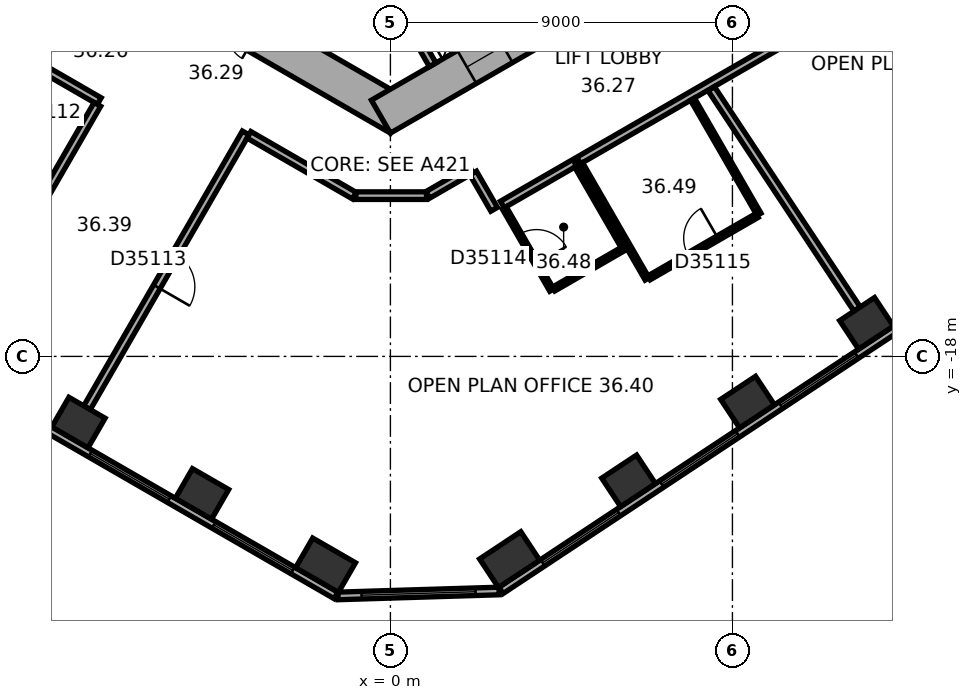
"""IFC4 building model, lengths in metres.
Left out: names, types, materials, properties, quantities, classifications, styles, units other than length and angle.
Written with IfcOpenShell. Run it as: python <this file> out.ifc"""

import sys

from ifc_helpers import new_model, si_unit, direction, frame, frame_2d, origin, origin_2d, place, context, subcontext, project, spatial, rectangle, extrude, element, fill, save


model = new_model("IFC4")
c1 = context("Model", 3, precision=1e-05, world=origin(), true_north=direction((0.0, 1.0)))
c2 = subcontext(c1, "Body", "Model", "MODEL_VIEW")
j1 = project(units=[si_unit("LENGTHUNIT", "METRE"), si_unit("PLANEANGLEUNIT", "RADIAN")], contexts=[c1])
p1 = place(None, origin())
s1 = spatial("IfcSite", under=j1, at=p1, CompositionType="ELEMENT")
p2 = place(p1, origin())
s2 = spatial("IfcBuilding", under=s1, at=p2, CompositionType="ELEMENT")
p3 = place(p2, frame((0.0, 0.0, 150.3)))
s3 = spatial("IfcBuildingStorey", under=s2, at=p3, CompositionType="ELEMENT", Elevation=150.3)
for number, where, z_axis, x_axis in (
    (1, (-8.208, -19.74, 0.0), (0.0, 0.0, 1.0), (0.866, -0.5, 0.0)),
    (2, (-4.958, -21.617, 0.0), (0.0, 0.0, 1.0), (0.866, -0.5, 0.0)),
):
    element("IfcColumn", number, at=place(p3, frame(where, z_axis=z_axis, x_axis=x_axis)), inside=s3, PredefinedType="COLUMN", context=c2, shape_type="SweptSolid", body=[
        extrude(rectangle(XDim=1.1, YDim=0.9, at=origin_2d()), origin(), (0.0, 0.0, 1.0), 3.7),
    ])
for number, where, z_axis, x_axis in (
    (3, (-1.706, -23.494, 0.0), (0.0, 0.0, 1.0), (0.866, -0.5, 0.0)),
    (4, (3.137, -23.346, 0.0), (0.0, 0.0, 1.0), (0.834, 0.552, 0.0)),
):
    element("IfcColumn", number, at=place(p3, frame(where, z_axis=z_axis, x_axis=x_axis)), inside=s3, PredefinedType="COLUMN", context=c2, shape_type="SweptSolid", body=[
        extrude(rectangle(XDim=1.3, YDim=0.9, at=origin_2d()), origin(), (0.0, 0.0, 1.0), 3.7),
    ])
for number, where, z_axis, x_axis in (
    (5, (6.268, -21.274, 0.0), (0.0, 0.0, 1.0), (0.834, 0.552, 0.0)),
    (6, (9.398, -19.202, 0.0), (0.0, 0.0, 1.0), (0.834, 0.552, 0.0)),
    (7, (12.529, -17.13, 0.0), (0.0, 0.0, 1.0), (0.834, 0.552, 0.0)),
):
    element("IfcColumn", number, at=place(p3, frame(where, z_axis=z_axis, x_axis=x_axis)), inside=s3, PredefinedType="COLUMN", context=c2, shape_type="SweptSolid", body=[
        extrude(rectangle(XDim=1.1, YDim=0.9, at=origin_2d()), origin(), (0.0, 0.0, 1.0), 3.7),
    ])
p4 = place(p3, frame((-10.25, -5.629, 0.0), z_axis=(0.0, 0.0, 1.0), x_axis=(0.866022616891, -0.50000482701, 0.0)))
e8 = element("IfcWall", 8, at=p4, inside=s3, PredefinedType="SHEAR", context=c2, shape_type="SweptSolid", body=[
    extrude(rectangle(XDim=12.125, YDim=1.0, at=frame_2d((6.062, 0.0))), origin(), (0.0, 0.0, 1.0), 3.7),
])
p5 = place(p4, frame((6.262, 0.0, 0.0)))
e9 = element("IfcOpeningElement", 9, at=p5, cuts=e8, PredefinedType="OPENING", context=c2, shape_type="SweptSolid", body=[
    extrude(rectangle(XDim=1.5, YDim=2.1, at=frame_2d((0.75, 1.05))), frame((0.0, 0.51, 0.0), z_axis=(0.0, -1.0, 0.0), x_axis=(1.0, 0.0, 0.0)), (0.0, 0.0, 1.0), 1.02),
])
p6 = place(p4, frame((1.712, 0.0, 0.0)))
e10 = element("IfcOpeningElement", 10, at=p6, cuts=e8, PredefinedType="OPENING", context=c2, shape_type="SweptSolid", body=[
    extrude(rectangle(XDim=1.1, YDim=2.1, at=frame_2d((0.55, 1.05))), frame((0.0, 0.51, 0.0), z_axis=(0.0, -1.0, 0.0), x_axis=(1.0, 0.0, 0.0)), (0.0, 0.0, 1.0), 1.02),
])
p7 = place(p4, frame((4.312, 0.0, 0.0)))
e11 = element("IfcOpeningElement", 11, at=p7, cuts=e8, PredefinedType="OPENING", context=c2, shape_type="SweptSolid", body=[
    extrude(rectangle(XDim=1.1, YDim=2.1, at=frame_2d((0.55, 1.05))), frame((0.0, 0.51, 0.0), z_axis=(0.0, -1.0, 0.0), x_axis=(1.0, 0.0, 0.0)), (0.0, 0.0, 1.0), 1.02),
])
p8 = place(p3, frame((-0.25, -11.691, 0.0), z_axis=(0.0, 0.0, 1.0), x_axis=(0.866022616891, 0.50000482701, 0.0)))
e12 = element("IfcWall", 12, at=p8, inside=s3, PredefinedType="SHEAR", context=c2, shape_type="SweptSolid", body=[
    extrude(rectangle(XDim=12.125, YDim=1.0, at=frame_2d((6.062, 0.0))), origin(), (0.0, 0.0, 1.0), 3.7),
])
p9 = place(p8, frame((2.612, 0.0, 0.0)))
e13 = element("IfcOpeningElement", 13, at=p9, cuts=e12, PredefinedType="OPENING", context=c2, shape_type="SweptSolid", body=[
    extrude(rectangle(XDim=1.1, YDim=2.1, at=frame_2d((0.55, 1.05))), frame((0.0, 0.51, 0.0), z_axis=(0.0, -1.0, 0.0), x_axis=(1.0, 0.0, 0.0)), (0.0, 0.0, 1.0), 1.02),
])
p10 = place(p8, frame((5.212, 0.0, 0.0)))
e14 = element("IfcOpeningElement", 14, at=p10, cuts=e12, PredefinedType="OPENING", context=c2, shape_type="SweptSolid", body=[
    extrude(rectangle(XDim=1.1, YDim=2.1, at=frame_2d((0.55, 1.05))), frame((0.0, 0.51, 0.0), z_axis=(0.0, -1.0, 0.0), x_axis=(1.0, 0.0, 0.0)), (0.0, 0.0, 1.0), 1.02),
])
p11 = place(p8, frame((7.812, 0.0, 0.0)))
e15 = element("IfcOpeningElement", 15, at=p11, cuts=e12, PredefinedType="OPENING", context=c2, shape_type="SweptSolid", body=[
    extrude(rectangle(XDim=1.1, YDim=2.1, at=frame_2d((0.55, 1.05))), frame((0.0, 0.51, 0.0), z_axis=(0.0, -1.0, 0.0), x_axis=(1.0, 0.0, 0.0)), (0.0, 0.0, 1.0), 1.02),
])
p12 = place(p3, frame((-18.789, -14.267, 0.0), z_axis=(0.0, 0.0, 1.0), x_axis=(0.866023315909, -0.500003616288, 0.0)))
e16 = element("IfcWall", 16, at=p12, inside=s3, PredefinedType="STANDARD", context=c2, shape_type="SweptSolid", body=[
    extrude(rectangle(XDim=20.044, YDim=0.2, at=frame_2d((10.022, 0.0))), origin(), (0.0, 0.0, 1.0), 3.7),
])
p13 = place(p12, frame((1.314, 0.0, 0.9)))
e17 = element("IfcOpeningElement", 17, at=p13, cuts=e16, PredefinedType="OPENING", context=c2, shape_type="SweptSolid", body=[
    extrude(rectangle(XDim=2.4, YDim=2.0, at=frame_2d((1.2, 1.0))), frame((0.0, 0.11, 0.0), z_axis=(0.0, -1.0, 0.0), x_axis=(1.0, 0.0, 0.0)), (0.0, 0.0, 1.0), 0.22),
])
p14 = place(p12, frame((5.069, 0.0, 0.9)))
e18 = element("IfcOpeningElement", 18, at=p14, cuts=e16, PredefinedType="OPENING", context=c2, shape_type="SweptSolid", body=[
    extrude(rectangle(XDim=2.4, YDim=2.0, at=frame_2d((1.2, 1.0))), frame((0.0, 0.11, 0.0), z_axis=(0.0, -1.0, 0.0), x_axis=(1.0, 0.0, 0.0)), (0.0, 0.0, 1.0), 0.22),
])
p15 = place(p12, frame((8.823, 0.0, 0.9)))
e19 = element("IfcOpeningElement", 19, at=p15, cuts=e16, PredefinedType="OPENING", context=c2, shape_type="SweptSolid", body=[
    extrude(rectangle(XDim=2.4, YDim=2.0, at=frame_2d((1.2, 1.0))), frame((0.0, 0.11, 0.0), z_axis=(0.0, -1.0, 0.0), x_axis=(1.0, 0.0, 0.0)), (0.0, 0.0, 1.0), 0.22),
])
p16 = place(p12, frame((12.577, 0.0, 0.9)))
e20 = element("IfcOpeningElement", 20, at=p16, cuts=e16, PredefinedType="OPENING", context=c2, shape_type="SweptSolid", body=[
    extrude(rectangle(XDim=2.4, YDim=2.0, at=frame_2d((1.2, 1.0))), frame((0.0, 0.11, 0.0), z_axis=(0.0, -1.0, 0.0), x_axis=(1.0, 0.0, 0.0)), (0.0, 0.0, 1.0), 0.22),
])
p17 = place(p12, frame((16.331, 0.0, 0.9)))
e21 = element("IfcOpeningElement", 21, at=p17, cuts=e16, PredefinedType="OPENING", context=c2, shape_type="SweptSolid", body=[
    extrude(rectangle(XDim=2.4, YDim=2.0, at=frame_2d((1.2, 1.0))), frame((0.0, 0.11, 0.0), z_axis=(0.0, -1.0, 0.0), x_axis=(1.0, 0.0, 0.0)), (0.0, 0.0, 1.0), 0.22),
])
p18 = place(p3, frame((-1.378, -24.302, 0.0), z_axis=(0.0, 0.0, 1.0), x_axis=(0.999533857267, 0.030529791629, 0.0)))
e22 = element("IfcWall", 22, at=p18, inside=s3, PredefinedType="STANDARD", context=c2, shape_type="SweptSolid", body=[
    extrude(rectangle(XDim=4.238, YDim=0.2, at=frame_2d((2.119, 0.0))), origin(), (0.0, 0.0, 1.0), 3.7),
])
p19 = place(p18, frame((0.619, 0.0, 0.9)))
e23 = element("IfcOpeningElement", 23, at=p19, cuts=e22, PredefinedType="OPENING", context=c2, shape_type="SweptSolid", body=[
    extrude(rectangle(XDim=3.0, YDim=2.0, at=frame_2d((1.5, 1.0))), frame((0.0, 0.11, 0.0), z_axis=(0.0, -1.0, 0.0), x_axis=(1.0, 0.0, 0.0)), (0.0, 0.0, 1.0), 0.22),
])
p20 = place(p3, frame((2.911, -24.156, 0.0), z_axis=(0.0, 0.0, 1.0), x_axis=(0.833882163564, 0.551942512668, 0.0)))
e24 = element("IfcWall", 24, at=p20, inside=s3, PredefinedType="STANDARD", context=c2, shape_type="SweptSolid", body=[
    extrude(rectangle(XDim=20.044, YDim=0.2, at=frame_2d((10.022, 0.0))), origin(), (0.0, 0.0, 1.0), 3.7),
])
p21 = place(p20, frame((1.313, 0.0, 0.9)))
e25 = element("IfcOpeningElement", 25, at=p21, cuts=e24, PredefinedType="OPENING", context=c2, shape_type="SweptSolid", body=[
    extrude(rectangle(XDim=2.4, YDim=2.0, at=frame_2d((1.2, 1.0))), frame((0.0, 0.11, 0.0), z_axis=(0.0, -1.0, 0.0), x_axis=(1.0, 0.0, 0.0)), (0.0, 0.0, 1.0), 0.22),
])
p22 = place(p20, frame((5.067, 0.0, 0.9)))
e26 = element("IfcOpeningElement", 26, at=p22, cuts=e24, PredefinedType="OPENING", context=c2, shape_type="SweptSolid", body=[
    extrude(rectangle(XDim=2.4, YDim=2.0, at=frame_2d((1.2, 1.0))), frame((0.0, 0.11, 0.0), z_axis=(0.0, -1.0, 0.0), x_axis=(1.0, 0.0, 0.0)), (0.0, 0.0, 1.0), 0.22),
])
p23 = place(p20, frame((8.821, 0.0, 0.9)))
e27 = element("IfcOpeningElement", 27, at=p23, cuts=e24, PredefinedType="OPENING", context=c2, shape_type="SweptSolid", body=[
    extrude(rectangle(XDim=2.4, YDim=2.0, at=frame_2d((1.2, 1.0))), frame((0.0, 0.11, 0.0), z_axis=(0.0, -1.0, 0.0), x_axis=(1.0, 0.0, 0.0)), (0.0, 0.0, 1.0), 0.22),
])
p24 = place(p20, frame((12.575, 0.0, 0.9)))
e28 = element("IfcOpeningElement", 28, at=p24, cuts=e24, PredefinedType="OPENING", context=c2, shape_type="SweptSolid", body=[
    extrude(rectangle(XDim=2.4, YDim=2.0, at=frame_2d((1.2, 1.0))), frame((0.0, 0.11, 0.0), z_axis=(0.0, -1.0, 0.0), x_axis=(1.0, 0.0, 0.0)), (0.0, 0.0, 1.0), 0.22),
])
p25 = place(p20, frame((16.329, 0.0, 0.9)))
e29 = element("IfcOpeningElement", 29, at=p25, cuts=e24, PredefinedType="OPENING", context=c2, shape_type="SweptSolid", body=[
    extrude(rectangle(XDim=2.4, YDim=2.0, at=frame_2d((1.2, 1.0))), frame((0.0, 0.11, 0.0), z_axis=(0.0, -1.0, 0.0), x_axis=(1.0, 0.0, 0.0)), (0.0, 0.0, 1.0), 0.22),
])
p26 = place(p3, frame((0.013, -8.422, 0.0), z_axis=(0.0, 0.0, 1.0), x_axis=(0.500077893725, -0.86598042715, 0.0)))
e30 = element("IfcWall", 30, at=p26, inside=s3, PredefinedType="PARTITIONING", context=c2, shape_type="SweptSolid", body=[
    extrude(rectangle(XDim=2.2, YDim=0.2, at=frame_2d((1.1, 0.0))), origin(), (0.0, 0.0, 1.0), 3.42),
])
p27 = place(p3, frame((-11.435, -9.103, 0.0), z_axis=(0.0, 0.0, 1.0), x_axis=(0.866007399799, -0.500031182522, 0.0)))
e31 = element("IfcWall", 31, at=p27, inside=s3, PredefinedType="PARTITIONING", context=c2, shape_type="SweptSolid", body=[
    extrude(rectangle(XDim=4.358, YDim=0.2, at=frame_2d((2.179, 0.0))), origin(), (0.0, 0.0, 1.0), 3.42),
])
p28 = place(p3, frame((-11.235, -17.474, 0.0), z_axis=(0.0, 0.0, 1.0), x_axis=(0.500009260695, 0.866020057054, 0.0)))
e32 = element("IfcWall", 32, at=p28, inside=s3, PredefinedType="PARTITIONING", context=c2, shape_type="SweptSolid", body=[
    extrude(rectangle(XDim=7.049, YDim=0.2, at=frame_2d((3.524, 0.0))), origin(), (0.0, 0.0, 1.0), 2.87),
])
p29 = place(p28, frame((3.024, 0.0, 0.0)))
e33 = element("IfcOpeningElement", 33, at=p29, cuts=e32, PredefinedType="OPENING", context=c2, shape_type="SweptSolid", body=[
    extrude(rectangle(XDim=1.0, YDim=2.1, at=frame_2d((0.5, 1.05))), frame((0.0, 0.11, 0.0), z_axis=(0.0, -1.0, 0.0), x_axis=(1.0, 0.0, 0.0)), (0.0, 0.0, 1.0), 0.22),
])
p30 = place(p3, frame((-7.984, -19.351, 0.0), z_axis=(0.0, 0.0, 1.0), x_axis=(0.500010139422, 0.866019549707, 0.0)))
e34 = element("IfcWall", 34, at=p30, inside=s3, PredefinedType="PARTITIONING", context=c2, shape_type="SweptSolid", body=[
    extrude(rectangle(XDim=8.35, YDim=0.2, at=frame_2d((4.175, 0.0))), origin(), (0.0, 0.0, 1.0), 3.42),
])
p31 = place(p30, frame((3.675, 0.0, 0.0)))
e35 = element("IfcOpeningElement", 35, at=p31, cuts=e34, PredefinedType="OPENING", context=c2, shape_type="SweptSolid", body=[
    extrude(rectangle(XDim=1.0, YDim=2.1, at=frame_2d((0.5, 1.05))), frame((0.0, 0.11, 0.0), z_axis=(0.0, -1.0, 0.0), x_axis=(1.0, 0.0, 0.0)), (0.0, 0.0, 1.0), 0.22),
])
p32 = place(p3, frame((-3.722, -12.169, 0.0), z_axis=(0.0, 0.0, 1.0), x_axis=(0.866033163891, -0.499986558861, 0.0)))
e36 = element("IfcWall", 36, at=p32, inside=s3, PredefinedType="PARTITIONING", context=c2, shape_type="SweptSolid", body=[
    extrude(rectangle(XDim=3.201, YDim=0.2, at=frame_2d((1.6, 0.0))), origin(), (0.0, 0.0, 1.0), 3.42),
])
p33 = place(p3, frame((-0.91, -13.77, 0.0), z_axis=(0.0, 0.0, 1.0), x_axis=(1.0, 0.0, 0.0)))
e37 = element("IfcWall", 37, at=p33, inside=s3, PredefinedType="PARTITIONING", context=c2, shape_type="SweptSolid", body=[
    extrude(rectangle(XDim=1.86, YDim=0.2, at=frame_2d((0.93, 0.0))), origin(), (0.0, 0.0, 1.0), 3.42),
])
p34 = place(p3, frame((0.985, -13.75, 0.0), z_axis=(0.0, 0.0, 1.0), x_axis=(0.866028661061, 0.499994358189, 0.0)))
e38 = element("IfcWall", 38, at=p34, inside=s3, PredefinedType="PARTITIONING", context=c2, shape_type="SweptSolid", body=[
    extrude(rectangle(XDim=1.321, YDim=0.2, at=frame_2d((0.661, 0.0))), origin(), (0.0, 0.0, 1.0), 3.42),
])
p35 = place(p3, frame((2.179, -13.176, 0.0), z_axis=(0.0, 0.0, 1.0), x_axis=(0.499978356969, -0.866037899034, 0.0)))
e39 = element("IfcWall", 39, at=p35, inside=s3, PredefinedType="PARTITIONING", context=c2, shape_type="SweptSolid", body=[
    extrude(rectangle(XDim=1.101, YDim=0.2, at=frame_2d((0.551, 0.0))), origin(), (0.0, 0.0, 1.0), 3.42),
])
p36 = place(p3, frame((2.946, -14.004, 0.0), z_axis=(0.0, 0.0, 1.0), x_axis=(0.866008176907, 0.50002983664, 0.0)))
e40 = element("IfcWall", 40, at=p36, inside=s3, PredefinedType="PARTITIONING", context=c2, shape_type="SweptSolid", body=[
    extrude(rectangle(XDim=2.2, YDim=0.2, at=frame_2d((1.1, 0.0))), origin(), (0.0, 0.0, 1.0), 3.42),
])
p37 = place(p3, frame((4.246, -16.256, 0.0), z_axis=(0.0, 0.0, 1.0), x_axis=(-0.499961950354, 0.866047370643, 0.0)))
e41 = element("IfcWall", 41, at=p37, inside=s3, PredefinedType="PARTITIONING", context=c2, shape_type="SweptSolid", body=[
    extrude(rectangle(XDim=2.5, YDim=0.12, at=frame_2d((1.25, 0.0))), origin(), (0.0, 0.0, 1.0), 3.42),
])
p38 = place(p37, frame((0.8, 0.0, 0.0)))
e42 = element("IfcOpeningElement", 42, at=p38, cuts=e41, PredefinedType="OPENING", context=c2, shape_type="SweptSolid", body=[
    extrude(rectangle(XDim=0.9, YDim=2.1, at=frame_2d((0.45, 1.05))), frame((0.0, 0.07, 0.0), z_axis=(0.0, -1.0, 0.0), x_axis=(1.0, 0.0, 0.0)), (0.0, 0.0, 1.0), 0.14),
])
p39 = place(p3, frame((4.901, -12.991, 0.0), z_axis=(0.0, 0.0, 1.0), x_axis=(0.500004234368, -0.866022959057, 0.0)))
e43 = element("IfcWall", 43, at=p39, inside=s3, PredefinedType="PARTITIONING", context=c2, shape_type="SweptSolid", body=[
    extrude(rectangle(XDim=2.5, YDim=0.12, at=frame_2d((1.25, 0.0))), origin(), (0.0, 0.0, 1.0), 3.42),
])
p40 = place(p3, frame((4.955, -12.844, 0.0), z_axis=(0.0, 0.0, 1.0), x_axis=(0.86602379309, 0.500002789795, 0.0)))
e44 = element("IfcWall", 44, at=p40, inside=s3, PredefinedType="PARTITIONING", context=c2, shape_type="SweptSolid", body=[
    extrude(rectangle(XDim=6.232, YDim=0.2, at=frame_2d((3.116, 0.0))), origin(), (0.0, 0.0, 1.0), 3.42),
])
p41 = place(p3, frame((6.099, -15.186, 0.0), z_axis=(0.0, 0.0, 1.0), x_axis=(-0.866009661879, -0.500027264788, 0.0)))
e45 = element("IfcWall", 45, at=p41, inside=s3, PredefinedType="PARTITIONING", context=c2, shape_type="SweptSolid", body=[
    extrude(rectangle(XDim=2.08, YDim=0.12, at=frame_2d((1.04, 0.0))), origin(), (0.0, 0.0, 1.0), 3.42),
])
for number, where, z_axis, x_axis in (
    (46, (6.755, -15.962, 0.0), (0.0, 0.0, 1.0), (-0.5, 0.866, 0.0)),
    (47, (7.949, -11.231, 0.0), (0.0, 0.0, 1.0), (0.5, -0.866, 0.0)),
):
    element("IfcWall", number, at=place(p3, frame(where, z_axis=z_axis, x_axis=x_axis)), inside=s3, PredefinedType="PARTITIONING", context=c2, shape_type="SweptSolid", body=[
        extrude(rectangle(XDim=3.5, YDim=0.12, at=frame_2d((1.75, 0.0))), origin(), (0.0, 0.0, 1.0), 3.42),
    ])
p42 = place(p3, frame((9.647, -14.292, 0.0), z_axis=(0.0, 0.0, 1.0), x_axis=(-0.866040564224, -0.499973740429, 0.0)))
e48 = element("IfcWall", 48, at=p42, inside=s3, PredefinedType="PARTITIONING", context=c2, shape_type="SweptSolid", body=[
    extrude(rectangle(XDim=3.28, YDim=0.12, at=frame_2d((1.64, 0.0))), origin(), (0.0, 0.0, 1.0), 3.42),
])
p43 = place(p42, frame((1.19, 0.0, 0.0)))
e49 = element("IfcOpeningElement", 49, at=p43, cuts=e48, PredefinedType="OPENING", context=c2, shape_type="SweptSolid", body=[
    extrude(rectangle(XDim=0.9, YDim=2.1, at=frame_2d((0.45, 1.05))), frame((0.0, 0.07, 0.0), z_axis=(0.0, -1.0, 0.0), x_axis=(1.0, 0.0, 0.0)), (0.0, 0.0, 1.0), 0.14),
])
p44 = place(p3, frame((12.281, -16.755, 0.0), z_axis=(0.0, 0.0, 1.0), x_axis=(-0.551925794663, 0.833893228888, 0.0)))
e50 = element("IfcWall", 50, at=p44, inside=s3, PredefinedType="PARTITIONING", context=c2, shape_type="SweptSolid", body=[
    extrude(rectangle(XDim=6.953, YDim=0.2, at=frame_2d((3.476, 0.0))), origin(), (0.0, 0.0, 1.0), 3.42),
])
p45 = place(p16, origin())
e51 = element("IfcWindow", 51, at=p45, inside=s3, PartitioningType="SINGLE_PANEL", PredefinedType="WINDOW", context=c2, shape_type="SweptSolid", body=[
    extrude(rectangle(XDim=2.4, YDim=2.0, at=frame_2d((1.2, 1.0))), frame((0.0, 0.03, 0.0), z_axis=(0.0, -1.0, 0.0), x_axis=(1.0, 0.0, 0.0)), (0.0, 0.0, 1.0), 0.06),
])
fill(e20, e51)
p46 = place(p17, origin())
e52 = element("IfcWindow", 52, at=p46, inside=s3, PartitioningType="SINGLE_PANEL", PredefinedType="WINDOW", context=c2, shape_type="SweptSolid", body=[
    extrude(rectangle(XDim=2.4, YDim=2.0, at=frame_2d((1.2, 1.0))), frame((0.0, 0.03, 0.0), z_axis=(0.0, -1.0, 0.0), x_axis=(1.0, 0.0, 0.0)), (0.0, 0.0, 1.0), 0.06),
])
fill(e21, e52)
p47 = place(p19, origin())
e53 = element("IfcWindow", 53, at=p47, inside=s3, PartitioningType="SINGLE_PANEL", PredefinedType="WINDOW", context=c2, shape_type="SweptSolid", body=[
    extrude(rectangle(XDim=3.0, YDim=2.0, at=frame_2d((1.5, 1.0))), frame((0.0, 0.03, 0.0), z_axis=(0.0, -1.0, 0.0), x_axis=(1.0, 0.0, 0.0)), (0.0, 0.0, 1.0), 0.06),
])
fill(e23, e53)
p48 = place(p21, origin())
e54 = element("IfcWindow", 54, at=p48, inside=s3, PartitioningType="SINGLE_PANEL", PredefinedType="WINDOW", context=c2, shape_type="SweptSolid", body=[
    extrude(rectangle(XDim=2.4, YDim=2.0, at=frame_2d((1.2, 1.0))), frame((0.0, 0.03, 0.0), z_axis=(0.0, -1.0, 0.0), x_axis=(1.0, 0.0, 0.0)), (0.0, 0.0, 1.0), 0.06),
])
fill(e25, e54)
p49 = place(p22, origin())
e55 = element("IfcWindow", 55, at=p49, inside=s3, PartitioningType="SINGLE_PANEL", PredefinedType="WINDOW", context=c2, shape_type="SweptSolid", body=[
    extrude(rectangle(XDim=2.4, YDim=2.0, at=frame_2d((1.2, 1.0))), frame((0.0, 0.03, 0.0), z_axis=(0.0, -1.0, 0.0), x_axis=(1.0, 0.0, 0.0)), (0.0, 0.0, 1.0), 0.06),
])
fill(e26, e55)
p50 = place(p23, origin())
e56 = element("IfcWindow", 56, at=p50, inside=s3, PartitioningType="SINGLE_PANEL", PredefinedType="WINDOW", context=c2, shape_type="SweptSolid", body=[
    extrude(rectangle(XDim=2.4, YDim=2.0, at=frame_2d((1.2, 1.0))), frame((0.0, 0.03, 0.0), z_axis=(0.0, -1.0, 0.0), x_axis=(1.0, 0.0, 0.0)), (0.0, 0.0, 1.0), 0.06),
])
fill(e27, e56)
p51 = place(p9, origin())
e57 = element("IfcDoor", 57, at=p51, inside=s3, OperationType="DOUBLE_DOOR_SLIDING", PredefinedType="DOOR", context=c2, shape_type="SweptSolid", body=[
    extrude(rectangle(XDim=1.1, YDim=2.1, at=frame_2d((0.55, 1.05))), frame((0.0, 0.025, 0.0), z_axis=(0.0, -1.0, 0.0), x_axis=(1.0, 0.0, 0.0)), (0.0, 0.0, 1.0), 0.05),
])
fill(e13, e57)
p52 = place(p31, origin())
e58 = element("IfcDoor", 58, at=p52, inside=s3, OperationType="SINGLE_SWING_LEFT", PredefinedType="DOOR", context=c2, shape_type="SweptSolid", body=[
    extrude(rectangle(XDim=1.0, YDim=2.1, at=frame_2d((0.5, 1.05))), frame((0.0, 0.025, 0.0), z_axis=(0.0, -1.0, 0.0), x_axis=(1.0, 0.0, 0.0)), (0.0, 0.0, 1.0), 0.05),
])
fill(e35, e58)
p53 = place(p38, origin())
e59 = element("IfcDoor", 59, at=p53, inside=s3, OperationType="SINGLE_SWING_LEFT", PredefinedType="DOOR", context=c2, shape_type="SweptSolid", body=[
    extrude(rectangle(XDim=0.9, YDim=2.1, at=frame_2d((0.45, 1.05))), frame((0.0, 0.025, 0.0), z_axis=(0.0, -1.0, 0.0), x_axis=(1.0, 0.0, 0.0)), (0.0, 0.0, 1.0), 0.05),
])
fill(e42, e59)
p54 = place(p43, origin())
e60 = element("IfcDoor", 60, at=p54, inside=s3, OperationType="SINGLE_SWING_LEFT", PredefinedType="DOOR", context=c2, shape_type="SweptSolid", body=[
    extrude(rectangle(XDim=0.9, YDim=2.1, at=frame_2d((0.45, 1.05))), frame((0.0, 0.025, 0.0), z_axis=(0.0, -1.0, 0.0), x_axis=(1.0, 0.0, 0.0)), (0.0, 0.0, 1.0), 0.05),
])
fill(e49, e60)
save(model, sys.argv[1])
